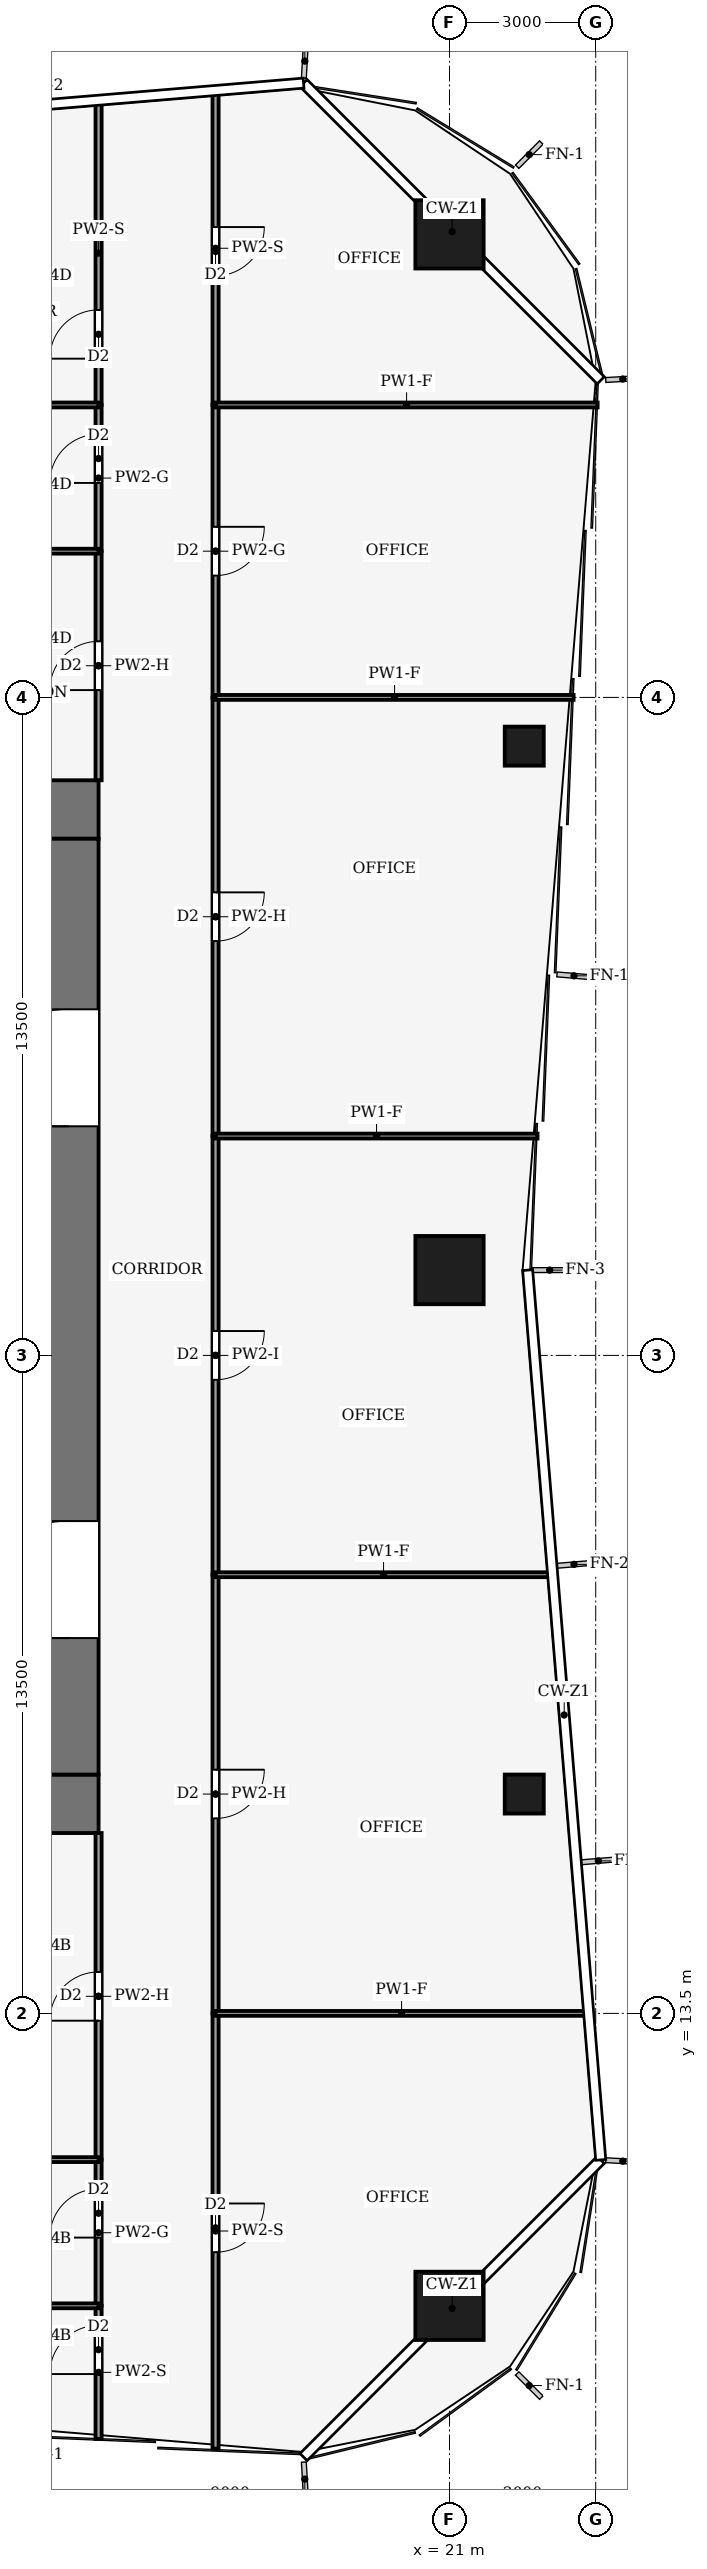
"""IFC4 building model, lengths in metres.
Left out: names, types, materials, properties, quantities, classifications, styles, units other than length and angle.
Written with IfcOpenShell. Run it as: python <this file> out.ifc"""

import sys

from ifc_helpers import new_model, si_unit, direction, frame, frame_2d, origin, origin_2d, place, context, subcontext, project, spatial, rectangle, hollow_rectangle, extrude, element, fill, save


model = new_model("IFC4")
c1 = context("Model", 3, precision=1e-05, world=origin(), true_north=direction((0.0, 1.0)))
c2 = subcontext(c1, "Body", "Model", "MODEL_VIEW")
j1 = project(units=[si_unit("LENGTHUNIT", "METRE"), si_unit("PLANEANGLEUNIT", "RADIAN")], contexts=[c1])
p1 = place(None, origin())
s1 = spatial("IfcSite", under=j1, at=p1, CompositionType="ELEMENT")
p2 = place(p1, origin())
s2 = spatial("IfcBuilding", under=s1, at=p2, CompositionType="ELEMENT")
p3 = place(p2, frame((0.0, 0.0, 106.0)))
s3 = spatial("IfcBuildingStorey", under=s2, at=p3, CompositionType="ELEMENT", Elevation=106.0)
for number, where, z_axis, x_axis in (
    (1, (-13.8, 17.8, -0.13), (0.0, 0.0, 1.0), (1.0, 0.0, 0.0)),
    (2, (-13.8, 38.2, -0.13), (0.0, 0.0, 1.0), (1.0, 0.0, 0.0)),
):
    element("IfcWall", number, at=place(p3, frame(where, z_axis=z_axis, x_axis=x_axis)), inside=s3, PredefinedType="SHEAR", context=c2, shape_type="SweptSolid", body=[
        extrude(rectangle(XDim=27.6, YDim=1.2, at=frame_2d((13.8, 0.0))), origin(), (0.0, 0.0, 1.0), 4.0),
    ])
p4 = place(p3, frame((13.2, 18.4, -0.13), z_axis=(0.0, 0.0, 1.0), x_axis=(0.0, 1.0, 0.0)))
e3 = element("IfcWall", 3, at=p4, inside=s3, PredefinedType="SHEAR", context=c2, shape_type="SweptSolid", body=[
    extrude(rectangle(XDim=19.2, YDim=1.2, at=frame_2d((9.6, 0.0))), origin(), (0.0, 0.0, 1.0), 4.0),
])
p5 = place(p4, frame((2.8, 0.0, 0.13)))
e4 = element("IfcOpeningElement", 4, at=p5, cuts=e3, PredefinedType="OPENING", context=c2, shape_type="SweptSolid", body=[
    extrude(rectangle(XDim=2.4, YDim=2.4, at=frame_2d((1.2, 1.2))), frame((0.0, 0.61, 0.0), z_axis=(0.0, -1.0, 0.0), x_axis=(1.0, 0.0, 0.0)), (0.0, 0.0, 1.0), 1.22),
])
p6 = place(p4, frame((13.3, 0.0, 0.13)))
e5 = element("IfcOpeningElement", 5, at=p6, cuts=e3, PredefinedType="OPENING", context=c2, shape_type="SweptSolid", body=[
    extrude(rectangle(XDim=2.4, YDim=2.4, at=frame_2d((1.2, 1.2))), frame((0.0, 0.61, 0.0), z_axis=(0.0, -1.0, 0.0), x_axis=(1.0, 0.0, 0.0)), (0.0, 0.0, 1.0), 1.22),
])
for number, where, z_axis, x_axis in (
    (6, (21.0, 50.0, 0.0), (0.0, 0.0, 1.0), (1.0, 0.0, 0.0)),
    (7, (21.0, 28.75, 0.0), (0.0, 0.0, 1.0), (1.0, 0.0, 0.0)),
    (8, (21.0, 7.5, 0.0), (0.0, 0.0, 1.0), (1.0, 0.0, 0.0)),
):
    element("IfcColumn", number, at=place(p3, frame(where, z_axis=z_axis, x_axis=x_axis)), inside=s3, PredefinedType="COLUMN", context=c2, shape_type="SweptSolid", body=[
        extrude(hollow_rectangle(XDim=1.4, YDim=1.4, WallThickness=0.08, at=origin_2d()), origin(), (0.0, 0.0, 1.0), 4.0),
    ])
for number, where, z_axis, x_axis in (
    (9, (22.534, 18.0, 0.0), (0.0, 0.0, 1.0), (1.0, 0.0, 0.0)),
    (10, (22.534, 39.5, 0.0), (0.0, 0.0, 1.0), (1.0, 0.0, 0.0)),
):
    element("IfcColumn", number, at=place(p3, frame(where, z_axis=z_axis, x_axis=x_axis)), inside=s3, PredefinedType="COLUMN", context=c2, shape_type="SweptSolid", body=[
        extrude(hollow_rectangle(XDim=0.8, YDim=0.8, WallThickness=0.04, at=origin_2d()), origin(), (0.0, 0.0, 1.0), 4.0),
    ])
p7 = place(p3, frame((16.2, 13.5, 0.0), z_axis=(0.0, 0.0, 1.0), x_axis=(0.0, -1.0, 0.0)))
e11 = element("IfcWall", 11, at=p7, inside=s3, PredefinedType="PARTITIONING", context=c2, shape_type="SweptSolid", body=[
    extrude(rectangle(XDim=8.93, YDim=0.125, at=frame_2d((4.465, 0.0))), origin(), (0.0, 0.0, 1.0), 3.04),
])
p8 = place(p7, frame((3.9, 0.0, 0.0)))
e12 = element("IfcOpeningElement", 12, at=p8, cuts=e11, PredefinedType="OPENING", context=c2, shape_type="SweptSolid", body=[
    extrude(rectangle(XDim=1.0, YDim=2.1, at=frame_2d((0.5, 1.05))), frame((0.0, 0.073, 0.0), z_axis=(0.0, -1.0, 0.0), x_axis=(1.0, 0.0, 0.0)), (0.0, 0.0, 1.0), 0.145),
])
p9 = place(p3, frame((16.2, 22.5, 0.0), z_axis=(0.0, 0.0, 1.0), x_axis=(0.0, -1.0, 0.0)))
e13 = element("IfcWall", 13, at=p9, inside=s3, PredefinedType="PARTITIONING", context=c2, shape_type="SweptSolid", body=[
    extrude(rectangle(XDim=9.0, YDim=0.125, at=frame_2d((4.5, 0.0))), origin(), (0.0, 0.0, 1.0), 3.14),
])
p10 = place(p9, frame((4.0, 0.0, 0.0)))
e14 = element("IfcOpeningElement", 14, at=p10, cuts=e13, PredefinedType="OPENING", context=c2, shape_type="SweptSolid", body=[
    extrude(rectangle(XDim=1.0, YDim=2.1, at=frame_2d((0.5, 1.05))), frame((0.0, 0.073, 0.0), z_axis=(0.0, -1.0, 0.0), x_axis=(1.0, 0.0, 0.0)), (0.0, 0.0, 1.0), 0.145),
])
p11 = place(p3, frame((16.2, 31.5, 0.0), z_axis=(0.0, 0.0, 1.0), x_axis=(0.0, -1.0, 0.0)))
e15 = element("IfcWall", 15, at=p11, inside=s3, PredefinedType="PARTITIONING", context=c2, shape_type="SweptSolid", body=[
    extrude(rectangle(XDim=9.0, YDim=0.125, at=frame_2d((4.5, 0.0))), origin(), (0.0, 0.0, 1.0), 3.48),
])
p12 = place(p11, frame((4.0, 0.0, 0.0)))
e16 = element("IfcOpeningElement", 16, at=p12, cuts=e15, PredefinedType="OPENING", context=c2, shape_type="SweptSolid", body=[
    extrude(rectangle(XDim=1.0, YDim=2.1, at=frame_2d((0.5, 1.05))), frame((0.0, 0.073, 0.0), z_axis=(0.0, -1.0, 0.0), x_axis=(1.0, 0.0, 0.0)), (0.0, 0.0, 1.0), 0.145),
])
p13 = place(p3, frame((16.2, 40.5, 0.0), z_axis=(0.0, 0.0, 1.0), x_axis=(0.0, -1.0, 0.0)))
e17 = element("IfcWall", 17, at=p13, inside=s3, PredefinedType="PARTITIONING", context=c2, shape_type="SweptSolid", body=[
    extrude(rectangle(XDim=9.0, YDim=0.125, at=frame_2d((4.5, 0.0))), origin(), (0.0, 0.0, 1.0), 3.14),
])
p14 = place(p13, frame((4.0, 0.0, 0.0)))
e18 = element("IfcOpeningElement", 18, at=p14, cuts=e17, PredefinedType="OPENING", context=c2, shape_type="SweptSolid", body=[
    extrude(rectangle(XDim=1.0, YDim=2.1, at=frame_2d((0.5, 1.05))), frame((0.0, 0.073, 0.0), z_axis=(0.0, -1.0, 0.0), x_axis=(1.0, 0.0, 0.0)), (0.0, 0.0, 1.0), 0.145),
])
p15 = place(p3, frame((16.2, 46.5, 0.0), z_axis=(0.0, 0.0, 1.0), x_axis=(0.0, -1.0, 0.0)))
e19 = element("IfcWall", 19, at=p15, inside=s3, PredefinedType="PARTITIONING", context=c2, shape_type="SweptSolid", body=[
    extrude(rectangle(XDim=6.0, YDim=0.125, at=frame_2d((3.0, 0.0))), origin(), (0.0, 0.0, 1.0), 3.87),
])
p16 = place(p15, frame((2.5, 0.0, 0.0)))
e20 = element("IfcOpeningElement", 20, at=p16, cuts=e19, PredefinedType="OPENING", context=c2, shape_type="SweptSolid", body=[
    extrude(rectangle(XDim=1.0, YDim=2.1, at=frame_2d((0.5, 1.05))), frame((0.0, 0.073, 0.0), z_axis=(0.0, -1.0, 0.0), x_axis=(1.0, 0.0, 0.0)), (0.0, 0.0, 1.0), 0.145),
])
p17 = place(p3, frame((16.2, 52.93, 0.0), z_axis=(0.0, 0.0, 1.0), x_axis=(0.0, -1.0, 0.0)))
e21 = element("IfcWall", 21, at=p17, inside=s3, PredefinedType="PARTITIONING", context=c2, shape_type="SweptSolid", body=[
    extrude(rectangle(XDim=6.43, YDim=0.125, at=frame_2d((3.215, 0.0))), origin(), (0.0, 0.0, 1.0), 3.04),
])
p18 = place(p17, frame((2.78, 0.0, 0.0)))
e22 = element("IfcOpeningElement", 22, at=p18, cuts=e21, PredefinedType="OPENING", context=c2, shape_type="SweptSolid", body=[
    extrude(rectangle(XDim=1.0, YDim=2.1, at=frame_2d((0.5, 1.05))), frame((0.0, 0.073, 0.0), z_axis=(0.0, -1.0, 0.0), x_axis=(1.0, 0.0, 0.0)), (0.0, 0.0, 1.0), 0.145),
])
p19 = place(p3, frame((13.8, 4.77, 0.0), z_axis=(0.0, 0.0, 1.0), x_axis=(0.0, 1.0, 0.0)))
e23 = element("IfcWall", 23, at=p19, inside=s3, PredefinedType="PARTITIONING", context=c2, shape_type="SweptSolid", body=[
    extrude(rectangle(XDim=2.73, YDim=0.125, at=frame_2d((1.365, 0.0))), origin(), (0.0, 0.0, 1.0), 3.04),
])
p20 = place(p19, frame((1.33, 0.0, 0.0)))
e24 = element("IfcOpeningElement", 24, at=p20, cuts=e23, PredefinedType="OPENING", context=c2, shape_type="SweptSolid", body=[
    extrude(rectangle(XDim=1.0, YDim=2.1, at=frame_2d((0.5, 1.05))), frame((0.0, 0.073, 0.0), z_axis=(0.0, -1.0, 0.0), x_axis=(1.0, 0.0, 0.0)), (0.0, 0.0, 1.0), 0.145),
])
p21 = place(p3, frame((13.8, 7.5, 0.0), z_axis=(0.0, 0.0, 1.0), x_axis=(0.0, 1.0, 0.0)))
e25 = element("IfcWall", 25, at=p21, inside=s3, PredefinedType="PARTITIONING", context=c2, shape_type="SweptSolid", body=[
    extrude(rectangle(XDim=3.0, YDim=0.125, at=frame_2d((1.5, 0.0))), origin(), (0.0, 0.0, 1.0), 3.87),
])
p22 = place(p21, frame((1.4, 0.0, 0.0)))
e26 = element("IfcOpeningElement", 26, at=p22, cuts=e25, PredefinedType="OPENING", context=c2, shape_type="SweptSolid", body=[
    extrude(rectangle(XDim=1.0, YDim=2.1, at=frame_2d((0.5, 1.05))), frame((0.0, 0.073, 0.0), z_axis=(0.0, -1.0, 0.0), x_axis=(1.0, 0.0, 0.0)), (0.0, 0.0, 1.0), 0.145),
])
p23 = place(p3, frame((13.8, 10.5, 0.0), z_axis=(0.0, 0.0, 1.0), x_axis=(0.0, 1.0, 0.0)))
e27 = element("IfcWall", 27, at=p23, inside=s3, PredefinedType="PARTITIONING", context=c2, shape_type="SweptSolid", body=[
    extrude(rectangle(XDim=6.7, YDim=0.125, at=frame_2d((3.35, 0.0))), origin(), (0.0, 0.0, 1.0), 3.14),
])
p24 = place(p23, frame((2.85, 0.0, 0.0)))
e28 = element("IfcOpeningElement", 28, at=p24, cuts=e27, PredefinedType="OPENING", context=c2, shape_type="SweptSolid", body=[
    extrude(rectangle(XDim=1.0, YDim=2.1, at=frame_2d((0.5, 1.05))), frame((0.0, 0.073, 0.0), z_axis=(0.0, -1.0, 0.0), x_axis=(1.0, 0.0, 0.0)), (0.0, 0.0, 1.0), 0.145),
])
p25 = place(p3, frame((13.8, 38.8, 0.0), z_axis=(0.0, 0.0, 1.0), x_axis=(0.0, 1.0, 0.0)))
e29 = element("IfcWall", 29, at=p25, inside=s3, PredefinedType="PARTITIONING", context=c2, shape_type="SweptSolid", body=[
    extrude(rectangle(XDim=4.7, YDim=0.125, at=frame_2d((2.35, 0.0))), origin(), (0.0, 0.0, 1.0), 3.14),
])
p26 = place(p25, frame((1.85, 0.0, 0.0)))
e30 = element("IfcOpeningElement", 30, at=p26, cuts=e29, PredefinedType="OPENING", context=c2, shape_type="SweptSolid", body=[
    extrude(rectangle(XDim=1.0, YDim=2.1, at=frame_2d((0.5, 1.05))), frame((0.0, 0.073, 0.0), z_axis=(0.0, -1.0, 0.0), x_axis=(1.0, 0.0, 0.0)), (0.0, 0.0, 1.0), 0.145),
])
p27 = place(p3, frame((13.8, 43.5, 0.0), z_axis=(0.0, 0.0, 1.0), x_axis=(0.0, 1.0, 0.0)))
e31 = element("IfcWall", 31, at=p27, inside=s3, PredefinedType="PARTITIONING", context=c2, shape_type="SweptSolid", body=[
    extrude(rectangle(XDim=3.0, YDim=0.125, at=frame_2d((1.5, 0.0))), origin(), (0.0, 0.0, 1.0), 3.87),
])
p28 = place(p27, frame((1.4, 0.0, 0.0)))
e32 = element("IfcOpeningElement", 32, at=p28, cuts=e31, PredefinedType="OPENING", context=c2, shape_type="SweptSolid", body=[
    extrude(rectangle(XDim=1.0, YDim=2.1, at=frame_2d((0.5, 1.05))), frame((0.0, 0.073, 0.0), z_axis=(0.0, -1.0, 0.0), x_axis=(1.0, 0.0, 0.0)), (0.0, 0.0, 1.0), 0.145),
])
p29 = place(p3, frame((13.8, 46.5, 0.0), z_axis=(0.0, 0.0, 1.0), x_axis=(0.0, 1.0, 0.0)))
e33 = element("IfcWall", 33, at=p29, inside=s3, PredefinedType="PARTITIONING", context=c2, shape_type="SweptSolid", body=[
    extrude(rectangle(XDim=6.23, YDim=0.125, at=frame_2d((3.115, 0.0))), origin(), (0.0, 0.0, 1.0), 3.04),
])
p30 = place(p29, frame((0.95, 0.0, 0.0)))
e34 = element("IfcOpeningElement", 34, at=p30, cuts=e33, PredefinedType="OPENING", context=c2, shape_type="SweptSolid", body=[
    extrude(rectangle(XDim=1.0, YDim=2.1, at=frame_2d((0.5, 1.05))), frame((0.0, 0.073, 0.0), z_axis=(0.0, -1.0, 0.0), x_axis=(1.0, 0.0, 0.0)), (0.0, 0.0, 1.0), 0.145),
])
p31 = place(p3, frame((23.833, 13.5, 0.0), z_axis=(0.0, 0.0, 1.0), x_axis=(-1.0, 0.0, 0.0)))
e35 = element("IfcWall", 35, at=p31, inside=s3, PredefinedType="PARTITIONING", context=c2, shape_type="SweptSolid", body=[
    extrude(rectangle(XDim=7.634, YDim=0.1, at=frame_2d((3.817, 0.0))), origin(), (0.0, 0.0, 1.0), 3.04),
])
p32 = place(p3, frame((23.094, 22.5, 0.0), z_axis=(0.0, 0.0, 1.0), x_axis=(-1.0, 0.0, 0.0)))
e36 = element("IfcWall", 36, at=p32, inside=s3, PredefinedType="PARTITIONING", context=c2, shape_type="SweptSolid", body=[
    extrude(rectangle(XDim=6.894, YDim=0.1, at=frame_2d((3.447, 0.0))), origin(), (0.0, 0.0, 1.0), 3.04),
])
p33 = place(p3, frame((22.806, 31.5, 0.0), z_axis=(0.0, 0.0, 1.0), x_axis=(-1.0, 0.0, 0.0)))
e37 = element("IfcWall", 37, at=p33, inside=s3, PredefinedType="PARTITIONING", context=c2, shape_type="SweptSolid", body=[
    extrude(rectangle(XDim=6.606, YDim=0.1, at=frame_2d((3.303, 0.0))), origin(), (0.0, 0.0, 1.0), 3.04),
])
p34 = place(p3, frame((23.546, 40.5, 0.0), z_axis=(0.0, 0.0, 1.0), x_axis=(-1.0, 0.0, 0.0)))
e38 = element("IfcWall", 38, at=p34, inside=s3, PredefinedType="PARTITIONING", context=c2, shape_type="SweptSolid", body=[
    extrude(rectangle(XDim=7.346, YDim=0.1, at=frame_2d((3.673, 0.0))), origin(), (0.0, 0.0, 1.0), 3.04),
])
p35 = place(p3, frame((24.039, 46.5, 0.0), z_axis=(0.0, 0.0, 1.0), x_axis=(-1.0, 0.0, 0.0)))
e39 = element("IfcWall", 39, at=p35, inside=s3, PredefinedType="PARTITIONING", context=c2, shape_type="SweptSolid", body=[
    extrude(rectangle(XDim=7.839, YDim=0.1, at=frame_2d((3.919, 0.0))), origin(), (0.0, 0.0, 1.0), 3.04),
])
for number, where, z_axis, x_axis in (
    (40, (13.8, 7.5, 0.0), (0.0, 0.0, 1.0), (-1.0, 0.0, 0.0)),
    (41, (13.8, 10.5, 0.0), (0.0, 0.0, 1.0), (-1.0, 0.0, 0.0)),
):
    element("IfcWall", number, at=place(p3, frame(where, z_axis=z_axis, x_axis=x_axis)), inside=s3, PredefinedType="PARTITIONING", context=c2, shape_type="SweptSolid", body=[
        extrude(rectangle(XDim=3.3, YDim=0.1, at=frame_2d((1.65, 0.0))), origin(), (0.0, 0.0, 1.0), 3.44),
    ])
for number, where, z_axis, x_axis in (
    (42, (13.8, 43.5, 0.0), (0.0, 0.0, 1.0), (-1.0, 0.0, 0.0)),
    (43, (13.8, 46.5, 0.0), (0.0, 0.0, 1.0), (-1.0, 0.0, 0.0)),
):
    element("IfcWall", number, at=place(p3, frame(where, z_axis=z_axis, x_axis=x_axis)), inside=s3, PredefinedType="PARTITIONING", context=c2, shape_type="SweptSolid", body=[
        extrude(rectangle(XDim=3.3, YDim=0.1, at=frame_2d((1.65, 0.0))), origin(), (0.0, 0.0, 1.0), 3.39),
    ])
p36 = place(p5, origin())
e44 = element("IfcDoor", 44, at=p36, inside=s3, OperationType="DOUBLE_DOOR_SINGLE_SWING", PredefinedType="DOOR", context=c2, shape_type="SweptSolid", body=[
    extrude(rectangle(XDim=2.4, YDim=2.4, at=frame_2d((1.2, 1.2))), frame((0.0, 0.025, 0.0), z_axis=(0.0, -1.0, 0.0), x_axis=(1.0, 0.0, 0.0)), (0.0, 0.0, 1.0), 0.05),
])
fill(e4, e44)
p37 = place(p6, origin())
e45 = element("IfcDoor", 45, at=p37, inside=s3, OperationType="DOUBLE_DOOR_SINGLE_SWING", PredefinedType="DOOR", context=c2, shape_type="SweptSolid", body=[
    extrude(rectangle(XDim=2.4, YDim=2.4, at=frame_2d((1.2, 1.2))), frame((0.0, 0.025, 0.0), z_axis=(0.0, -1.0, 0.0), x_axis=(1.0, 0.0, 0.0)), (0.0, 0.0, 1.0), 0.05),
])
fill(e5, e45)
p38 = place(p8, origin())
e46 = element("IfcDoor", 46, at=p38, inside=s3, OperationType="SINGLE_SWING_LEFT", PredefinedType="DOOR", context=c2, shape_type="SweptSolid", body=[
    extrude(rectangle(XDim=1.0, YDim=2.1, at=frame_2d((0.5, 1.05))), frame((0.0, 0.025, 0.0), z_axis=(0.0, -1.0, 0.0), x_axis=(1.0, 0.0, 0.0)), (0.0, 0.0, 1.0), 0.05),
])
fill(e12, e46)
p39 = place(p10, origin())
e47 = element("IfcDoor", 47, at=p39, inside=s3, OperationType="SINGLE_SWING_LEFT", PredefinedType="DOOR", context=c2, shape_type="SweptSolid", body=[
    extrude(rectangle(XDim=1.0, YDim=2.1, at=frame_2d((0.5, 1.05))), frame((0.0, 0.025, 0.0), z_axis=(0.0, -1.0, 0.0), x_axis=(1.0, 0.0, 0.0)), (0.0, 0.0, 1.0), 0.05),
])
fill(e14, e47)
p40 = place(p12, origin())
e48 = element("IfcDoor", 48, at=p40, inside=s3, OperationType="SINGLE_SWING_RIGHT", PredefinedType="DOOR", context=c2, shape_type="SweptSolid", body=[
    extrude(rectangle(XDim=1.0, YDim=2.1, at=frame_2d((0.5, 1.05))), frame((0.0, 0.025, 0.0), z_axis=(0.0, -1.0, 0.0), x_axis=(1.0, 0.0, 0.0)), (0.0, 0.0, 1.0), 0.05),
])
fill(e16, e48)
p41 = place(p14, origin())
e49 = element("IfcDoor", 49, at=p41, inside=s3, OperationType="SINGLE_SWING_LEFT", PredefinedType="DOOR", context=c2, shape_type="SweptSolid", body=[
    extrude(rectangle(XDim=1.0, YDim=2.1, at=frame_2d((0.5, 1.05))), frame((0.0, 0.025, 0.0), z_axis=(0.0, -1.0, 0.0), x_axis=(1.0, 0.0, 0.0)), (0.0, 0.0, 1.0), 0.05),
])
fill(e18, e49)
p42 = place(p16, origin())
e50 = element("IfcDoor", 50, at=p42, inside=s3, OperationType="SINGLE_SWING_RIGHT", PredefinedType="DOOR", context=c2, shape_type="SweptSolid", body=[
    extrude(rectangle(XDim=1.0, YDim=2.1, at=frame_2d((0.5, 1.05))), frame((0.0, 0.025, 0.0), z_axis=(0.0, -1.0, 0.0), x_axis=(1.0, 0.0, 0.0)), (0.0, 0.0, 1.0), 0.05),
])
fill(e20, e50)
p43 = place(p18, origin())
e51 = element("IfcDoor", 51, at=p43, inside=s3, OperationType="SINGLE_SWING_RIGHT", PredefinedType="DOOR", context=c2, shape_type="SweptSolid", body=[
    extrude(rectangle(XDim=1.0, YDim=2.1, at=frame_2d((0.5, 1.05))), frame((0.0, 0.025, 0.0), z_axis=(0.0, -1.0, 0.0), x_axis=(1.0, 0.0, 0.0)), (0.0, 0.0, 1.0), 0.05),
])
fill(e22, e51)
p44 = place(p20, origin())
e52 = element("IfcDoor", 52, at=p44, inside=s3, OperationType="SINGLE_SWING_RIGHT", PredefinedType="DOOR", context=c2, shape_type="SweptSolid", body=[
    extrude(rectangle(XDim=1.0, YDim=2.1, at=frame_2d((0.5, 1.05))), frame((0.0, 0.025, 0.0), z_axis=(0.0, -1.0, 0.0), x_axis=(1.0, 0.0, 0.0)), (0.0, 0.0, 1.0), 0.05),
])
fill(e24, e52)
p45 = place(p22, origin())
e53 = element("IfcDoor", 53, at=p45, inside=s3, OperationType="SINGLE_SWING_RIGHT", PredefinedType="DOOR", context=c2, shape_type="SweptSolid", body=[
    extrude(rectangle(XDim=1.0, YDim=2.1, at=frame_2d((0.5, 1.05))), frame((0.0, 0.025, 0.0), z_axis=(0.0, -1.0, 0.0), x_axis=(1.0, 0.0, 0.0)), (0.0, 0.0, 1.0), 0.05),
])
fill(e26, e53)
p46 = place(p24, origin())
e54 = element("IfcDoor", 54, at=p46, inside=s3, OperationType="SINGLE_SWING_RIGHT", PredefinedType="DOOR", context=c2, shape_type="SweptSolid", body=[
    extrude(rectangle(XDim=1.0, YDim=2.1, at=frame_2d((0.5, 1.05))), frame((0.0, 0.025, 0.0), z_axis=(0.0, -1.0, 0.0), x_axis=(1.0, 0.0, 0.0)), (0.0, 0.0, 1.0), 0.05),
])
fill(e28, e54)
p47 = place(p26, origin())
e55 = element("IfcDoor", 55, at=p47, inside=s3, OperationType="SINGLE_SWING_LEFT", PredefinedType="DOOR", context=c2, shape_type="SweptSolid", body=[
    extrude(rectangle(XDim=1.0, YDim=2.1, at=frame_2d((0.5, 1.05))), frame((0.0, 0.025, 0.0), z_axis=(0.0, -1.0, 0.0), x_axis=(1.0, 0.0, 0.0)), (0.0, 0.0, 1.0), 0.05),
])
fill(e30, e55)
p48 = place(p28, origin())
e56 = element("IfcDoor", 56, at=p48, inside=s3, OperationType="SINGLE_SWING_RIGHT", PredefinedType="DOOR", context=c2, shape_type="SweptSolid", body=[
    extrude(rectangle(XDim=1.0, YDim=2.1, at=frame_2d((0.5, 1.05))), frame((0.0, 0.025, 0.0), z_axis=(0.0, -1.0, 0.0), x_axis=(1.0, 0.0, 0.0)), (0.0, 0.0, 1.0), 0.05),
])
fill(e32, e56)
p49 = place(p30, origin())
e57 = element("IfcDoor", 57, at=p49, inside=s3, OperationType="SINGLE_SWING_LEFT", PredefinedType="DOOR", context=c2, shape_type="SweptSolid", body=[
    extrude(rectangle(XDim=1.0, YDim=2.1, at=frame_2d((0.5, 1.05))), frame((0.0, 0.025, 0.0), z_axis=(0.0, -1.0, 0.0), x_axis=(1.0, 0.0, 0.0)), (0.0, 0.0, 1.0), 0.05),
])
fill(e34, e57)
save(model, sys.argv[1])
